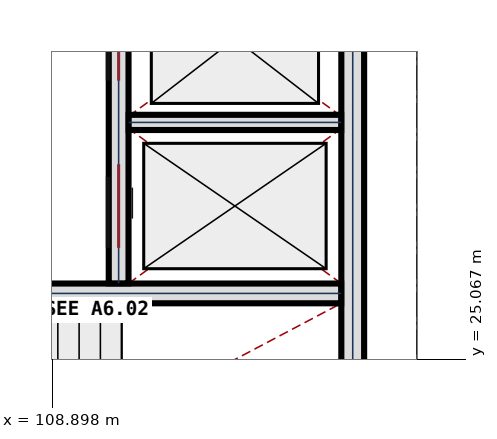
"""IFC4 building model, lengths in metres.
Left out: names, types, materials, properties, quantities, classifications, styles, units other than length and angle.
Written with IfcOpenShell. Run it as: python <this file> out.ifc"""

import sys

from ifc_helpers import new_model, si_unit, direction, frame, frame_2d, origin, place, context, subcontext, project, spatial, rectangle, extrude, element, fill, save


model = new_model("IFC4")
c1 = context("Model", 3, precision=1e-05, world=origin(), true_north=direction((0.0, 1.0)))
c2 = subcontext(c1, "Body", "Model", "MODEL_VIEW")
j1 = project(units=[si_unit("LENGTHUNIT", "METRE"), si_unit("PLANEANGLEUNIT", "RADIAN")], contexts=[c1])
p1 = place(None, origin())
s1 = spatial("IfcSite", under=j1, at=p1, CompositionType="ELEMENT")
p2 = place(p1, origin())
s2 = spatial("IfcBuilding", under=s1, at=p2, CompositionType="ELEMENT")
p3 = place(p2, frame((0.0, 0.0, 5.4)))
s3 = spatial("IfcBuildingStorey", under=s2, at=p3, CompositionType="ELEMENT", Elevation=5.4)
p4 = place(p3, frame((112.85, 30.298, 0.0), z_axis=(0.0, 0.0, 1.0), x_axis=(0.0, -1.0, 0.0)))
e1 = element("IfcWall", 1, at=p4, inside=s3, PredefinedType="SHEAR", context=c2, shape_type="SweptSolid", body=[
    extrude(rectangle(XDim=7.796, YDim=0.3, at=frame_2d((3.898, 0.0))), origin(), (0.0, 0.0, 1.0), 4.5),
])
p5 = place(p3, frame((103.502, 25.93, 0.0), z_axis=(0.0, 0.0, 1.0), x_axis=(1.0, 0.0, 0.0)))
e2 = element("IfcWall", 2, at=p5, inside=s3, PredefinedType="SHEAR", context=c2, shape_type="SweptSolid", body=[
    extrude(rectangle(XDim=9.196, YDim=0.26, at=frame_2d((4.598, 0.0))), origin(), (0.0, 0.0, 1.0), 4.5),
])
p6 = place(p5, frame((1.598, 0.0, 0.0)))
e3 = element("IfcOpeningElement", 3, at=p6, cuts=e2, PredefinedType="OPENING", context=c2, shape_type="SweptSolid", body=[
    extrude(rectangle(XDim=1.2, YDim=2.2, at=frame_2d((0.6, 1.1))), frame((0.0, 0.14, 0.0), z_axis=(0.0, -1.0, 0.0), x_axis=(1.0, 0.0, 0.0)), (0.0, 0.0, 1.0), 0.28),
])
p7 = place(p5, frame((0.143, 0.0, 0.0)))
e4 = element("IfcOpeningElement", 4, at=p7, cuts=e2, PredefinedType="OPENING", context=c2, shape_type="SweptSolid", body=[
    extrude(rectangle(XDim=0.85, YDim=2.05, at=frame_2d((0.425, 1.025))), frame((0.0, 0.14, 0.0), z_axis=(0.0, -1.0, 0.0), x_axis=(1.0, 0.0, 0.0)), (0.0, 0.0, 1.0), 0.28),
])
p8 = place(p3, frame((109.77, 26.062, 0.0), z_axis=(0.0, 0.0, 1.0), x_axis=(0.0, 1.0, 0.0)))
e5 = element("IfcWall", 5, at=p8, inside=s3, PredefinedType="SHEAR", context=c2, shape_type="SweptSolid", body=[
    extrude(rectangle(XDim=4.236, YDim=0.26, at=frame_2d((2.118, 0.0))), origin(), (0.0, 0.0, 1.0), 4.5),
])
p9 = place(p8, frame((0.468, 0.0, 0.0)))
e6 = element("IfcOpeningElement", 6, at=p9, cuts=e5, PredefinedType="OPENING", context=c2, shape_type="SweptSolid", body=[
    extrude(rectangle(XDim=1.1, YDim=2.15, at=frame_2d((0.55, 1.075))), frame((0.0, 0.14, 0.0), z_axis=(0.0, -1.0, 0.0), x_axis=(1.0, 0.0, 0.0)), (0.0, 0.0, 1.0), 0.28),
])
p10 = place(p8, frame((2.668, 0.0, 0.0)))
e7 = element("IfcOpeningElement", 7, at=p10, cuts=e5, PredefinedType="OPENING", context=c2, shape_type="SweptSolid", body=[
    extrude(rectangle(XDim=1.1, YDim=2.15, at=frame_2d((0.55, 1.075))), frame((0.0, 0.14, 0.0), z_axis=(0.0, -1.0, 0.0), x_axis=(1.0, 0.0, 0.0)), (0.0, 0.0, 1.0), 0.28),
])
p11 = place(p3, frame((109.902, 28.18, 0.0), z_axis=(0.0, 0.0, 1.0), x_axis=(1.0, 0.0, 0.0)))
e8 = element("IfcWall", 8, at=p11, inside=s3, PredefinedType="PLUMBINGWALL", context=c2, shape_type="SweptSolid", body=[
    extrude(rectangle(XDim=2.796, YDim=0.2, at=frame_2d((1.398, 0.0))), origin(), (0.0, 0.0, 1.0), 4.18),
])
p12 = place(p9, origin())
e9 = element("IfcDoor", 9, at=p12, inside=s3, OperationType="SLIDING_TO_LEFT", PredefinedType="DOOR", context=c2, shape_type="SweptSolid", body=[
    extrude(rectangle(XDim=1.1, YDim=2.15, at=frame_2d((0.55, 1.075))), frame((0.0, 0.032, 0.0), z_axis=(0.0, -1.0, 0.0), x_axis=(1.0, 0.0, 0.0)), (0.0, 0.0, 1.0), 0.065),
])
fill(e6, e9)
p13 = place(p10, origin())
e10 = element("IfcDoor", 10, at=p13, inside=s3, OperationType="SLIDING_TO_LEFT", PredefinedType="DOOR", context=c2, shape_type="SweptSolid", body=[
    extrude(rectangle(XDim=1.1, YDim=2.15, at=frame_2d((0.55, 1.075))), frame((0.0, 0.032, 0.0), z_axis=(0.0, -1.0, 0.0), x_axis=(1.0, 0.0, 0.0)), (0.0, 0.0, 1.0), 0.065),
])
fill(e7, e10)
save(model, sys.argv[1])
